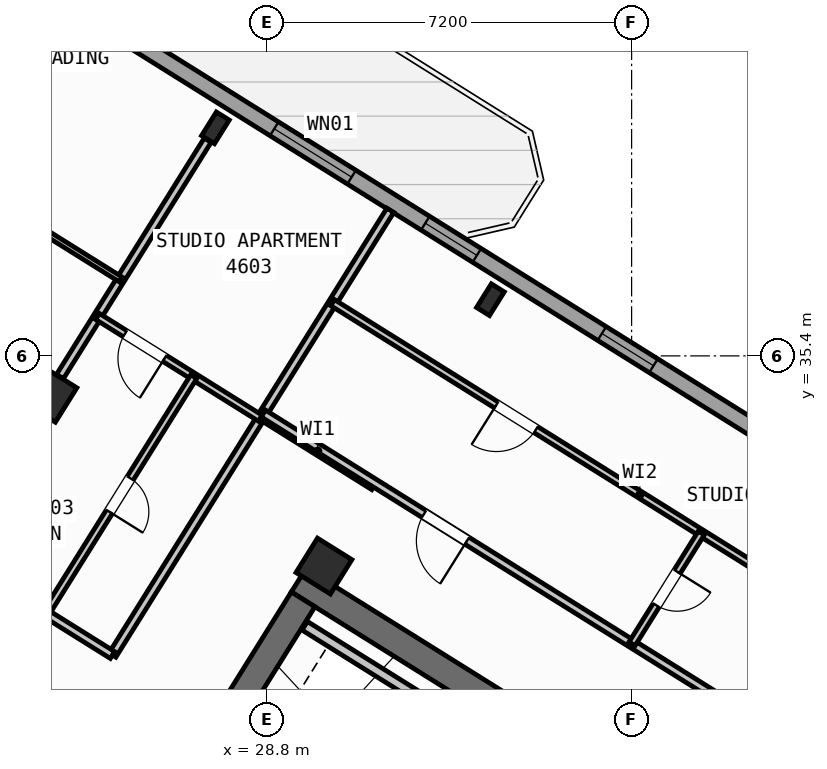
"""IFC4 building model, lengths in metres.
Left out: names, types, materials, properties, quantities, classifications, styles, units other than length and angle.
Written with IfcOpenShell. Run it as: python <this file> out.ifc"""

import sys

from ifc_helpers import new_model, si_unit, direction, frame, frame_2d, origin, origin_2d, place, context, subcontext, project, spatial, rectangle, hollow_rectangle, i_section, extrude, source, transform, mapped, element, fill, save


model = new_model("IFC4")
c1 = context("Model", 3, precision=1e-05, world=origin(), true_north=direction((0.0, 1.0)))
c2 = subcontext(c1, "Body", "Model", "MODEL_VIEW")
j1 = project(units=[si_unit("LENGTHUNIT", "METRE"), si_unit("PLANEANGLEUNIT", "RADIAN")], contexts=[c1])
p1 = place(None, origin())
s1 = spatial("IfcSite", under=j1, at=p1, CompositionType="ELEMENT")
p2 = place(p1, origin())
s2 = spatial("IfcBuilding", under=s1, at=p2, CompositionType="ELEMENT")
p3 = place(p2, frame((0.0, 0.0, 184.2)))
s3 = spatial("IfcBuildingStorey", under=s2, at=p3, CompositionType="ELEMENT", Elevation=184.2)
p4 = place(p3, frame((40.573, 24.01, 0.0), z_axis=(0.0, 0.0, 1.0), x_axis=(-0.848047359947, 0.529920442413, 0.0)))
e1 = element("IfcWall", 1, at=p4, inside=s3, PredefinedType="SHEAR", context=c2, shape_type="SweptSolid", body=[
    extrude(rectangle(XDim=13.14, YDim=0.55, at=frame_2d((6.57, 0.0))), origin(), (0.0, 0.0, 1.0), 3.35),
])
p5 = place(p3, frame((29.517, 30.594, 0.0), z_axis=(0.0, 0.0, 1.0), x_axis=(-0.529906864564, -0.848055844204, 0.0)))
e2 = element("IfcWall", 2, at=p5, inside=s3, PredefinedType="SHEAR", context=c2, shape_type="SweptSolid", body=[
    extrude(rectangle(XDim=3.575, YDim=0.55, at=frame_2d((1.788, 0.0))), origin(), (0.0, 0.0, 1.0), 3.35),
])
m1 = source(origin(), c2, "Body", "SweptSolid", [
    extrude(i_section(OverallWidth=0.3, OverallDepth=0.55, WebThickness=0.015, FlangeThickness=0.029, at=origin_2d()), origin(), (0.0, 0.0, 1.0), 3.6),
])
p6 = place(p3, frame((33.213, 36.509, 0.0), z_axis=(0.0, 0.0, 1.0), x_axis=(-0.848048096156, 0.529919264233, 0.0)))
e3 = element("IfcColumn", 3, at=p6, inside=s3, PredefinedType="COLUMN", context=c2, shape_type="MappedRepresentation", body=[
    mapped(m1, transform((0.0, 0.0, 0.0), scale=1.0)),
])
m2 = source(origin(), c2, "Body", "SweptSolid", [
    extrude(hollow_rectangle(XDim=0.8, YDim=0.8, WallThickness=0.032, at=origin_2d()), origin(), (0.0, 0.0, 1.0), 3.6),
])
p7 = place(p3, frame((29.928, 31.251, 0.0), z_axis=(0.0, 0.0, 1.0), x_axis=(-0.848048096156, 0.529919264233, 0.0)))
e4 = element("IfcColumn", 4, at=p7, inside=s3, PredefinedType="COLUMN", context=c2, shape_type="MappedRepresentation", body=[
    mapped(m2, transform((0.0, 0.0, 0.0), scale=1.0)),
])
p8 = place(p3, frame((27.786, 39.901, 0.0), z_axis=(0.0, 0.0, 1.0), x_axis=(-0.848048096156, 0.529919264233, 0.0)))
e5 = element("IfcColumn", 5, at=p8, inside=s3, PredefinedType="COLUMN", context=c2, shape_type="MappedRepresentation", body=[
    mapped(m1, transform((0.0, 0.0, 0.0), scale=1.0)),
])
p9 = place(p3, frame((24.5, 34.643, 0.0), z_axis=(0.0, 0.0, 1.0), x_axis=(-0.848048096156, 0.529919264233, 0.0)))
e6 = element("IfcColumn", 6, at=p9, inside=s3, PredefinedType="COLUMN", context=c2, shape_type="MappedRepresentation", body=[
    mapped(m2, transform((0.0, 0.0, 0.0), scale=1.0)),
])
p10 = place(p3, frame((17.424, 47.083, 0.0), z_axis=(0.0, 0.0, 1.0), x_axis=(0.848049927979, -0.529916332693, 0.0)))
e7 = element("IfcWall", 7, at=p10, inside=s3, PredefinedType="STANDARD", context=c2, shape_type="SweptSolid", body=[
    extrude(rectangle(XDim=29.223, YDim=0.32, at=frame_2d((14.612, 0.0))), origin(), (0.0, 0.0, 1.0), 3.35),
])
p11 = place(p10, frame((3.764, 0.0, 0.0)))
e8 = element("IfcOpeningElement", 8, at=p11, cuts=e7, PredefinedType="OPENING", context=c2, shape_type="SweptSolid", body=[
    extrude(rectangle(XDim=1.05, YDim=2.15, at=frame_2d((0.525, 1.075))), frame((0.0, 0.17, 0.0), z_axis=(0.0, -1.0, 0.0), x_axis=(1.0, 0.0, 0.0)), (0.0, 0.0, 1.0), 0.34),
])
p12 = place(p10, frame((8.344, 0.0, 0.8)))
e9 = element("IfcOpeningElement", 9, at=p12, cuts=e7, PredefinedType="OPENING", context=c2, shape_type="SweptSolid", body=[
    extrude(rectangle(XDim=2.1, YDim=1.55, at=frame_2d((1.05, 0.775))), frame((0.0, 0.17, 0.0), z_axis=(0.0, -1.0, 0.0), x_axis=(1.0, 0.0, 0.0)), (0.0, 0.0, 1.0), 0.34),
])
p13 = place(p10, frame((13.589, 0.0, 0.85)))
e10 = element("IfcOpeningElement", 10, at=p13, cuts=e7, PredefinedType="OPENING", context=c2, shape_type="SweptSolid", body=[
    extrude(rectangle(XDim=1.8, YDim=1.5, at=frame_2d((0.9, 0.75))), frame((0.0, 0.17, 0.0), z_axis=(0.0, -1.0, 0.0), x_axis=(1.0, 0.0, 0.0)), (0.0, 0.0, 1.0), 0.34),
])
p14 = place(p10, frame((17.104, 0.0, 0.95)))
e11 = element("IfcOpeningElement", 11, at=p14, cuts=e7, PredefinedType="OPENING", context=c2, shape_type="SweptSolid", body=[
    extrude(rectangle(XDim=1.2, YDim=1.4, at=frame_2d((0.6, 0.7))), frame((0.0, 0.17, 0.0), z_axis=(0.0, -1.0, 0.0), x_axis=(1.0, 0.0, 0.0)), (0.0, 0.0, 1.0), 0.34),
])
p15 = place(p10, frame((21.214, 0.0, 0.95)))
e12 = element("IfcOpeningElement", 12, at=p15, cuts=e7, PredefinedType="OPENING", context=c2, shape_type="SweptSolid", body=[
    extrude(rectangle(XDim=1.2, YDim=1.4, at=frame_2d((0.6, 0.7))), frame((0.0, 0.17, 0.0), z_axis=(0.0, -1.0, 0.0), x_axis=(1.0, 0.0, 0.0)), (0.0, 0.0, 1.0), 0.34),
])
p16 = place(p10, frame((25.853, 0.0, 0.95)))
e13 = element("IfcOpeningElement", 13, at=p16, cuts=e7, PredefinedType="OPENING", context=c2, shape_type="SweptSolid", body=[
    extrude(rectangle(XDim=1.2, YDim=1.4, at=frame_2d((0.6, 0.7))), frame((0.0, 0.17, 0.0), z_axis=(0.0, -1.0, 0.0), x_axis=(1.0, 0.0, 0.0)), (0.0, 0.0, 1.0), 0.34),
])
p17 = place(p3, frame((33.363, 27.69, 0.0), z_axis=(0.0, 0.0, 1.0), x_axis=(-0.848047090064, 0.529920874315, 0.0)))
e14 = element("IfcWall", 14, at=p17, inside=s3, PredefinedType="STANDARD", context=c2, shape_type="SweptSolid", body=[
    extrude(rectangle(XDim=4.498, YDim=0.2, at=frame_2d((2.249, 0.0))), origin(), (0.0, 0.0, 1.0), 3.34),
])
p18 = place(p3, frame((30.914, 32.829, 0.0), z_axis=(0.0, 0.0, 1.0), x_axis=(-0.848008813643, 0.529982124211, 0.0)))
e15 = element("IfcWall", 15, at=p18, inside=s3, PredefinedType="PARTITIONING", context=c2, shape_type="SweptSolid", body=[
    extrude(rectangle(XDim=2.61, YDim=0.16, at=frame_2d((1.305, 0.0))), origin(), (0.0, 0.0, 1.0), 3.34),
])
p19 = place(p3, frame((31.239, 38.274, 0.0), z_axis=(0.0, 0.0, 1.0), x_axis=(-0.529914125013, -0.848051307476, 0.0)))
e16 = element("IfcWall", 16, at=p19, inside=s3, PredefinedType="PARTITIONING", context=c2, shape_type="SweptSolid", body=[
    extrude(rectangle(XDim=10.35, YDim=0.16, at=frame_2d((5.175, 0.0))), origin(), (0.0, 0.0, 1.0), 3.34),
])
p20 = place(p3, frame((25.754, 29.497, 0.0), z_axis=(0.0, 0.0, 1.0), x_axis=(-0.848045850158, 0.529922858565, 0.0)))
e17 = element("IfcWall", 17, at=p20, inside=s3, PredefinedType="PARTITIONING", context=c2, shape_type="SweptSolid", body=[
    extrude(rectangle(XDim=16.73, YDim=0.16, at=frame_2d((8.365, 0.0))), origin(), (0.0, 0.0, 1.0), 3.34),
])
p21 = place(p20, frame((2.22, 0.0, 0.0)))
e18 = element("IfcOpeningElement", 18, at=p21, cuts=e17, PredefinedType="OPENING", context=c2, shape_type="SweptSolid", body=[
    extrude(rectangle(XDim=0.86, YDim=2.05, at=frame_2d((0.43, 1.025))), frame((0.0, 0.09, 0.0), z_axis=(0.0, -1.0, 0.0), x_axis=(1.0, 0.0, 0.0)), (0.0, 0.0, 1.0), 0.18),
])
p22 = place(p20, frame((6.49, 0.0, 0.0)))
e19 = element("IfcOpeningElement", 19, at=p22, cuts=e17, PredefinedType="OPENING", context=c2, shape_type="SweptSolid", body=[
    extrude(rectangle(XDim=1.0, YDim=2.1, at=frame_2d((0.5, 1.05))), frame((0.0, 0.09, 0.0), z_axis=(0.0, -1.0, 0.0), x_axis=(1.0, 0.0, 0.0)), (0.0, 0.0, 1.0), 0.18),
])
p23 = place(p20, frame((14.304, 0.0, 0.0)))
e20 = element("IfcOpeningElement", 20, at=p23, cuts=e17, PredefinedType="OPENING", context=c2, shape_type="SweptSolid", body=[
    extrude(rectangle(XDim=1.0, YDim=2.1, at=frame_2d((0.5, 1.05))), frame((0.0, 0.09, 0.0), z_axis=(0.0, -1.0, 0.0), x_axis=(1.0, 0.0, 0.0)), (0.0, 0.0, 1.0), 0.18),
])
p24 = place(p3, frame((24.588, 27.631, 0.0), z_axis=(0.0, 0.0, 1.0), x_axis=(-0.848041752158, 0.529929416617, 0.0)))
e21 = element("IfcWall", 21, at=p24, inside=s3, PredefinedType="PARTITIONING", context=c2, shape_type="SweptSolid", body=[
    extrude(rectangle(XDim=16.73, YDim=0.16, at=frame_2d((8.365, 0.0))), origin(), (0.0, 0.0, 1.0), 3.34),
])
p25 = place(p24, frame((2.22, 0.0, 0.0)))
e22 = element("IfcOpeningElement", 22, at=p25, cuts=e21, PredefinedType="OPENING", context=c2, shape_type="SweptSolid", body=[
    extrude(rectangle(XDim=0.86, YDim=2.05, at=frame_2d((0.43, 1.025))), frame((0.0, 0.09, 0.0), z_axis=(0.0, -1.0, 0.0), x_axis=(1.0, 0.0, 0.0)), (0.0, 0.0, 1.0), 0.18),
])
p26 = place(p24, frame((7.82, 0.0, 0.0)))
e23 = element("IfcOpeningElement", 23, at=p26, cuts=e21, PredefinedType="OPENING", context=c2, shape_type="SweptSolid", body=[
    extrude(rectangle(XDim=1.0, YDim=2.1, at=frame_2d((0.5, 1.05))), frame((0.0, 0.09, 0.0), z_axis=(0.0, -1.0, 0.0), x_axis=(1.0, 0.0, 0.0)), (0.0, 0.0, 1.0), 0.18),
])
p27 = place(p24, frame((12.95, 0.0, 0.0)))
e24 = element("IfcOpeningElement", 24, at=p27, cuts=e21, PredefinedType="OPENING", context=c2, shape_type="SweptSolid", body=[
    extrude(rectangle(XDim=1.0, YDim=2.1, at=frame_2d((0.5, 1.05))), frame((0.0, 0.09, 0.0), z_axis=(0.0, -1.0, 0.0), x_axis=(1.0, 0.0, 0.0)), (0.0, 0.0, 1.0), 0.18),
])
p28 = place(p3, frame((27.634, 39.657, 0.0), z_axis=(0.0, 0.0, 1.0), x_axis=(-0.529899205623, -0.848060629837, 0.0)))
e25 = element("IfcWall", 25, at=p28, inside=s3, PredefinedType="PARTITIONING", context=c2, shape_type="SweptSolid", body=[
    extrude(rectangle(XDim=5.501, YDim=0.16, at=frame_2d((2.75, 0.0))), origin(), (0.0, 0.0, 1.0), 2.825),
])
p29 = place(p3, frame((28.674, 34.169, 0.0), z_axis=(0.0, 0.0, 1.0), x_axis=(-0.848059820872, 0.529900500304, 0.0)))
e26 = element("IfcWall", 26, at=p29, inside=s3, PredefinedType="PLUMBINGWALL", context=c2, shape_type="SweptSolid", body=[
    extrude(rectangle(XDim=3.79, YDim=0.14, at=frame_2d((1.895, 0.0))), origin(), (0.0, 0.0, 1.0), 3.34),
])
p30 = place(p29, frame((2.23, 0.0, 0.0)))
e27 = element("IfcOpeningElement", 27, at=p30, cuts=e26, PredefinedType="OPENING", context=c2, shape_type="SweptSolid", body=[
    extrude(rectangle(XDim=0.92, YDim=2.08, at=frame_2d((0.46, 1.04))), frame((0.0, 0.08, 0.0), z_axis=(0.0, -1.0, 0.0), x_axis=(1.0, 0.0, 0.0)), (0.0, 0.0, 1.0), 0.16),
])
p31 = place(p3, frame((27.359, 34.991, 0.0), z_axis=(0.0, 0.0, 1.0), x_axis=(-0.529907329021, -0.848055553988, 0.0)))
e28 = element("IfcWall", 28, at=p31, inside=s3, PredefinedType="PLUMBINGWALL", context=c2, shape_type="SweptSolid", body=[
    extrude(rectangle(XDim=5.51, YDim=0.14, at=frame_2d((2.755, 0.0))), origin(), (0.0, 0.0, 1.0), 2.995),
])
p32 = place(p31, frame((2.365, 0.0, 0.0)))
e29 = element("IfcOpeningElement", 29, at=p32, cuts=e28, PredefinedType="OPENING", context=c2, shape_type="SweptSolid", body=[
    extrude(rectangle(XDim=0.78, YDim=2.05, at=frame_2d((0.39, 1.025))), frame((0.0, 0.08, 0.0), z_axis=(0.0, -1.0, 0.0), x_axis=(1.0, 0.0, 0.0)), (0.0, 0.0, 1.0), 0.16),
])
p33 = place(p3, frame((25.916, 36.909, 0.0), z_axis=(0.0, 0.0, 1.0), x_axis=(-0.848056163074, 0.529906354247, 0.0)))
e30 = element("IfcWall", 30, at=p33, inside=s3, PredefinedType="PARTITIONING", context=c2, shape_type="SweptSolid", body=[
    extrude(rectangle(XDim=6.4, YDim=0.11, at=frame_2d((3.2, 0.0))), origin(), (0.0, 0.0, 1.0), 3.34),
])
p34 = place(p33, frame((2.74, 0.0, 0.0)))
e31 = element("IfcOpeningElement", 31, at=p34, cuts=e30, PredefinedType="OPENING", context=c2, shape_type="SweptSolid", body=[
    extrude(rectangle(XDim=0.92, YDim=2.08, at=frame_2d((0.46, 1.04))), frame((0.0, 0.065, 0.0), z_axis=(0.0, -1.0, 0.0), x_axis=(1.0, 0.0, 0.0)), (0.0, 0.0, 1.0), 0.13),
])
p35 = place(p3, frame((41.936, 26.012, 0.0), z_axis=(0.0, 0.0, 1.0), x_axis=(-0.848051154596, 0.529914369676, 0.0)))
e32 = element("IfcWall", 32, at=p35, inside=s3, PredefinedType="PARTITIONING", context=c2, shape_type="SweptSolid", body=[
    extrude(rectangle(XDim=15.57, YDim=0.16, at=frame_2d((7.785, 0.0))), origin(), (0.0, 0.0, 1.0), 3.34),
])
p36 = place(p35, frame((10.83, 0.0, 0.0)))
e33 = element("IfcOpeningElement", 33, at=p36, cuts=e32, PredefinedType="OPENING", context=c2, shape_type="SweptSolid", body=[
    extrude(rectangle(XDim=1.0, YDim=2.1, at=frame_2d((0.5, 1.05))), frame((0.0, 0.09, 0.0), z_axis=(0.0, -1.0, 0.0), x_axis=(1.0, 0.0, 0.0)), (0.0, 0.0, 1.0), 0.18),
])
p37 = place(p3, frame((42.226, 28.873, 0.0), z_axis=(0.0, 0.0, 1.0), x_axis=(-0.848049134363, 0.529917602752, 0.0)))
e34 = element("IfcWall", 34, at=p37, inside=s3, PredefinedType="PLUMBINGWALL", context=c2, shape_type="SweptSolid", body=[
    extrude(rectangle(XDim=14.3, YDim=0.14, at=frame_2d((7.15, 0.0))), origin(), (0.0, 0.0, 1.0), 3.34),
])
p38 = place(p37, frame((9.57, 0.0, 0.0)))
e35 = element("IfcOpeningElement", 35, at=p38, cuts=e34, PredefinedType="OPENING", context=c2, shape_type="SweptSolid", body=[
    extrude(rectangle(XDim=0.92, YDim=2.08, at=frame_2d((0.46, 1.04))), frame((0.0, 0.08, 0.0), z_axis=(0.0, -1.0, 0.0), x_axis=(1.0, 0.0, 0.0)), (0.0, 0.0, 1.0), 0.16),
])
p39 = place(p3, frame((37.375, 31.904, 0.0), z_axis=(0.0, 0.0, 1.0), x_axis=(-0.529913878929, -0.848051461244, 0.0)))
e36 = element("IfcWall", 36, at=p39, inside=s3, PredefinedType="PLUMBINGWALL", context=c2, shape_type="SweptSolid", body=[
    extrude(rectangle(XDim=2.58, YDim=0.14, at=frame_2d((1.29, 0.0))), origin(), (0.0, 0.0, 1.0), 3.34),
])
p40 = place(p39, frame((0.9, 0.0, 0.0)))
e37 = element("IfcOpeningElement", 37, at=p40, cuts=e36, PredefinedType="OPENING", context=c2, shape_type="SweptSolid", body=[
    extrude(rectangle(XDim=0.78, YDim=2.05, at=frame_2d((0.39, 1.025))), frame((0.0, 0.08, 0.0), z_axis=(0.0, -1.0, 0.0), x_axis=(1.0, 0.0, 0.0)), (0.0, 0.0, 1.0), 0.16),
])
m3 = source(origin(), c2, "Body", "SweptSolid", [
    extrude(rectangle(XDim=1.8, YDim=1.5, at=frame_2d((0.9, 0.75))), frame((0.0, 0.03, 0.0), z_axis=(0.0, -1.0, 0.0), x_axis=(1.0, 0.0, 0.0)), (0.0, 0.0, 1.0), 0.06),
])
p41 = place(p13, origin())
e38 = element("IfcWindow", 38, at=p41, inside=s3, PartitioningType="SINGLE_PANEL", PredefinedType="WINDOW", context=c2, shape_type="MappedRepresentation", body=[
    mapped(m3, transform((0.0, 0.0, 0.0), scale=1.0)),
])
fill(e10, e38)
m4 = source(origin(), c2, "Body", "SweptSolid", [
    extrude(rectangle(XDim=1.2, YDim=1.4, at=frame_2d((0.6, 0.7))), frame((0.0, 0.03, 0.0), z_axis=(0.0, -1.0, 0.0), x_axis=(1.0, 0.0, 0.0)), (0.0, 0.0, 1.0), 0.06),
])
p42 = place(p14, origin())
e39 = element("IfcWindow", 39, at=p42, inside=s3, PartitioningType="SINGLE_PANEL", PredefinedType="WINDOW", context=c2, shape_type="MappedRepresentation", body=[
    mapped(m4, transform((0.0, 0.0, 0.0), scale=1.0)),
])
fill(e11, e39)
p43 = place(p15, origin())
e40 = element("IfcWindow", 40, at=p43, inside=s3, PartitioningType="SINGLE_PANEL", PredefinedType="WINDOW", context=c2, shape_type="MappedRepresentation", body=[
    mapped(m4, transform((0.0, 0.0, 0.0), scale=1.0)),
])
fill(e12, e40)
m5 = source(origin(), c2, "Body", "SweptSolid", [
    extrude(rectangle(XDim=0.92, YDim=2.08, at=frame_2d((0.46, 1.04))), frame((0.0, 0.025, 0.0), z_axis=(0.0, -1.0, 0.0), x_axis=(1.0, 0.0, 0.0)), (0.0, 0.0, 1.0), 0.05),
])
p44 = place(p30, origin())
e41 = element("IfcDoor", 41, at=p44, inside=s3, OperationType="SINGLE_SWING_LEFT", PredefinedType="DOOR", context=c2, shape_type="MappedRepresentation", body=[
    mapped(m5, transform((0.0, 0.0, 0.0), scale=1.0)),
])
fill(e27, e41)
m6 = source(origin(), c2, "Body", "SweptSolid", [
    extrude(rectangle(XDim=0.78, YDim=2.05, at=frame_2d((0.39, 1.025))), frame((0.0, 0.025, 0.0), z_axis=(0.0, -1.0, 0.0), x_axis=(1.0, 0.0, 0.0)), (0.0, 0.0, 1.0), 0.05),
])
p45 = place(p32, origin())
e42 = element("IfcDoor", 42, at=p45, inside=s3, OperationType="SINGLE_SWING_RIGHT", PredefinedType="DOOR", context=c2, shape_type="MappedRepresentation", body=[
    mapped(m6, transform((0.0, 0.0, 0.0), scale=1.0)),
])
fill(e29, e42)
m7 = source(origin(), c2, "Body", "SweptSolid", [
    extrude(rectangle(XDim=1.0, YDim=2.1, at=frame_2d((0.5, 1.05))), frame((0.0, 0.025, 0.0), z_axis=(0.0, -1.0, 0.0), x_axis=(1.0, 0.0, 0.0)), (0.0, 0.0, 1.0), 0.05),
])
p46 = place(p36, origin())
e43 = element("IfcDoor", 43, at=p46, inside=s3, OperationType="SINGLE_SWING_LEFT", PredefinedType="DOOR", context=c2, shape_type="MappedRepresentation", body=[
    mapped(m7, transform((0.0, 0.0, 0.0), scale=1.0)),
])
fill(e33, e43)
p47 = place(p38, origin())
e44 = element("IfcDoor", 44, at=p47, inside=s3, OperationType="SINGLE_SWING_RIGHT", PredefinedType="DOOR", context=c2, shape_type="MappedRepresentation", body=[
    mapped(m5, transform((0.0, 0.0, 0.0), scale=1.0)),
])
fill(e35, e44)
p48 = place(p40, origin())
e45 = element("IfcDoor", 45, at=p48, inside=s3, OperationType="SINGLE_SWING_LEFT", PredefinedType="DOOR", context=c2, shape_type="MappedRepresentation", body=[
    mapped(m6, transform((0.0, 0.0, 0.0), scale=1.0)),
])
fill(e37, e45)
save(model, sys.argv[1])
